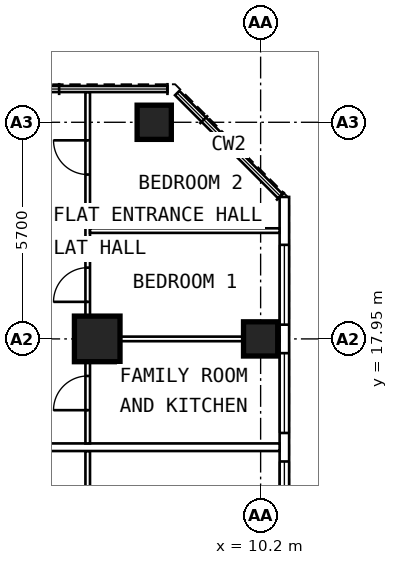
"""IFC4 building model, lengths in metres.
Left out: names, types, materials, properties, quantities, classifications, styles, units other than length and angle.
Written with IfcOpenShell. Run it as: python <this file> out.ifc"""

import sys

from ifc_helpers import new_model, si_unit, direction, frame, frame_2d, origin, origin_2d, place, context, subcontext, project, spatial, rectangle, extrude, element, fill, save


model = new_model("IFC4")
c1 = context("Model", 3, precision=1e-05, world=origin(), true_north=direction((0.0, 1.0)))
c2 = subcontext(c1, "Body", "Model", "MODEL_VIEW")
j1 = project(units=[si_unit("LENGTHUNIT", "METRE"), si_unit("PLANEANGLEUNIT", "RADIAN")], contexts=[c1])
p1 = place(None, origin())
s1 = spatial("IfcSite", under=j1, at=p1, CompositionType="ELEMENT")
p2 = place(p1, origin())
s2 = spatial("IfcBuilding", under=s1, at=p2, CompositionType="ELEMENT")
p3 = place(p2, frame((0.0, 0.0, 149.0)))
s3 = spatial("IfcBuildingStorey", under=s2, at=p3, CompositionType="ELEMENT", Elevation=149.0)
for number, where, z_axis, x_axis in (
    (1, (10.2, 17.95, 0.0), (0.0, 0.0, 1.0), (0.0, 1.0, 0.0)),
    (2, (7.4, 23.65, 0.0), (0.0, 0.0, 1.0), (0.0, 1.0, 0.0)),
):
    element("IfcColumn", number, at=place(p3, frame(where, z_axis=z_axis, x_axis=x_axis)), inside=s3, PredefinedType="COLUMN", context=c2, shape_type="SweptSolid", body=[
        extrude(rectangle(XDim=0.9, YDim=0.9, at=origin_2d()), origin(), (0.0, 0.0, 1.0), 3.6),
    ])
p4 = place(p3, frame((5.9, 17.95, 0.0), z_axis=(0.0, 0.0, 1.0), x_axis=(0.0, 1.0, 0.0)))
e3 = element("IfcColumn", 3, at=p4, inside=s3, PredefinedType="COLUMN", context=c2, shape_type="SweptSolid", body=[
    extrude(rectangle(XDim=1.2, YDim=1.2, at=origin_2d()), origin(), (0.0, 0.0, 1.0), 3.6),
])
p5 = place(p3, frame((10.825, 6.409, 0.0), z_axis=(0.0, 0.0, 1.0), x_axis=(0.0, 1.0, 0.0)))
e4 = element("IfcWall", 4, at=p5, inside=s3, PredefinedType="SOLIDWALL", context=c2, shape_type="SweptSolid", body=[
    extrude(rectangle(XDim=15.276, YDim=0.25, at=frame_2d((7.638, 0.0))), origin(), (0.0, 0.0, 1.0), 3.35),
])
p6 = place(p5, frame((0.516, 0.0, 0.8)))
e5 = element("IfcOpeningElement", 5, at=p6, cuts=e4, PredefinedType="OPENING", context=c2, shape_type="SweptSolid", body=[
    extrude(rectangle(XDim=2.1, YDim=1.8, at=frame_2d((1.05, 0.9))), frame((0.0, 0.137, 0.0), z_axis=(0.0, -1.0, 0.0), x_axis=(1.0, 0.0, 0.0)), (0.0, 0.0, 1.0), 0.274),
])
p7 = place(p5, frame((3.366, 0.0, 0.8)))
e6 = element("IfcOpeningElement", 6, at=p7, cuts=e4, PredefinedType="OPENING", context=c2, shape_type="SweptSolid", body=[
    extrude(rectangle(XDim=2.1, YDim=1.8, at=frame_2d((1.05, 0.9))), frame((0.0, 0.137, 0.0), z_axis=(0.0, -1.0, 0.0), x_axis=(1.0, 0.0, 0.0)), (0.0, 0.0, 1.0), 0.274),
])
p8 = place(p5, frame((6.216, 0.0, 0.8)))
e7 = element("IfcOpeningElement", 7, at=p8, cuts=e4, PredefinedType="OPENING", context=c2, shape_type="SweptSolid", body=[
    extrude(rectangle(XDim=2.1, YDim=1.8, at=frame_2d((1.05, 0.9))), frame((0.0, 0.137, 0.0), z_axis=(0.0, -1.0, 0.0), x_axis=(1.0, 0.0, 0.0)), (0.0, 0.0, 1.0), 0.274),
])
p9 = place(p5, frame((9.066, 0.0, 0.8)))
e8 = element("IfcOpeningElement", 8, at=p9, cuts=e4, PredefinedType="OPENING", context=c2, shape_type="SweptSolid", body=[
    extrude(rectangle(XDim=2.1, YDim=1.8, at=frame_2d((1.05, 0.9))), frame((0.0, 0.137, 0.0), z_axis=(0.0, -1.0, 0.0), x_axis=(1.0, 0.0, 0.0)), (0.0, 0.0, 1.0), 0.274),
])
p10 = place(p5, frame((11.916, 0.0, 0.8)))
e9 = element("IfcOpeningElement", 9, at=p10, cuts=e4, PredefinedType="OPENING", context=c2, shape_type="SweptSolid", body=[
    extrude(rectangle(XDim=2.1, YDim=1.8, at=frame_2d((1.05, 0.9))), frame((0.0, 0.137, 0.0), z_axis=(0.0, -1.0, 0.0), x_axis=(1.0, 0.0, 0.0)), (0.0, 0.0, 1.0), 0.274),
])
p11 = place(p3, frame((5.65, 9.6, 0.0), z_axis=(0.0, 0.0, 1.0), x_axis=(0.0, 1.0, 0.0)))
e10 = element("IfcWall", 10, at=p11, inside=s3, PredefinedType="PARTITIONING", context=c2, shape_type="SweptSolid", body=[
    extrude(rectangle(XDim=5.4, YDim=0.12, at=frame_2d((2.7, 0.0))), origin(), (0.0, 0.0, 1.0), 3.35),
])
p12 = place(p11, frame((3.4, 0.0, 0.0)))
e11 = element("IfcOpeningElement", 11, at=p12, cuts=e10, PredefinedType="OPENING", context=c2, shape_type="SweptSolid", body=[
    extrude(rectangle(XDim=0.9, YDim=2.1, at=frame_2d((0.45, 1.05))), frame((0.0, 0.072, 0.0), z_axis=(0.0, -1.0, 0.0), x_axis=(1.0, 0.0, 0.0)), (0.0, 0.0, 1.0), 0.144),
])
p13 = place(p3, frame((5.65, 15.2, 0.0), z_axis=(0.0, 0.0, 1.0), x_axis=(0.0, 1.0, 0.0)))
e12 = element("IfcWall", 12, at=p13, inside=s3, PredefinedType="PARTITIONING", context=c2, shape_type="SweptSolid", body=[
    extrude(rectangle(XDim=9.245, YDim=0.12, at=frame_2d((4.623, 0.0))), origin(), (0.0, 0.0, 1.0), 3.35),
])
p14 = place(p13, frame((0.875, 0.0, 0.0)))
e13 = element("IfcOpeningElement", 13, at=p14, cuts=e12, PredefinedType="OPENING", context=c2, shape_type="SweptSolid", body=[
    extrude(rectangle(XDim=0.9, YDim=2.1, at=frame_2d((0.45, 1.05))), frame((0.0, 0.072, 0.0), z_axis=(0.0, -1.0, 0.0), x_axis=(1.0, 0.0, 0.0)), (0.0, 0.0, 1.0), 0.144),
])
p15 = place(p13, frame((3.725, 0.0, 0.0)))
e14 = element("IfcOpeningElement", 14, at=p15, cuts=e12, PredefinedType="OPENING", context=c2, shape_type="SweptSolid", body=[
    extrude(rectangle(XDim=0.9, YDim=2.1, at=frame_2d((0.45, 1.05))), frame((0.0, 0.072, 0.0), z_axis=(0.0, -1.0, 0.0), x_axis=(1.0, 0.0, 0.0)), (0.0, 0.0, 1.0), 0.144),
])
p16 = place(p13, frame((7.075, 0.0, 0.0)))
e15 = element("IfcOpeningElement", 15, at=p16, cuts=e12, PredefinedType="OPENING", context=c2, shape_type="SweptSolid", body=[
    extrude(rectangle(XDim=0.9, YDim=2.1, at=frame_2d((0.45, 1.05))), frame((0.0, 0.072, 0.0), z_axis=(0.0, -1.0, 0.0), x_axis=(1.0, 0.0, 0.0)), (0.0, 0.0, 1.0), 0.144),
])
p17 = place(p3, frame((5.71, 17.95, 0.0), z_axis=(0.0, 0.0, 1.0), x_axis=(1.0, 0.0, 0.0)))
e16 = element("IfcWall", 16, at=p17, inside=s3, PredefinedType="PARTITIONING", context=c2, shape_type="SweptSolid", body=[
    extrude(rectangle(XDim=4.99, YDim=0.12, at=frame_2d((2.495, 0.0))), origin(), (0.0, 0.0, 1.0), 2.45),
])
p18 = place(p3, frame((5.71, 20.8, 0.0), z_axis=(0.0, 0.0, 1.0), x_axis=(1.0, 0.0, 0.0)))
e17 = element("IfcWall", 17, at=p18, inside=s3, PredefinedType="PARTITIONING", context=c2, shape_type="SweptSolid", body=[
    extrude(rectangle(XDim=4.99, YDim=0.12, at=frame_2d((2.495, 0.0))), origin(), (0.0, 0.0, 1.0), 3.35),
])
p19 = place(p3, frame((2.0, 15.1, 0.0), z_axis=(0.0, 0.0, 1.0), x_axis=(1.0, 0.0, 0.0)))
e18 = element("IfcWall", 18, at=p19, inside=s3, PredefinedType="PARTITIONING", context=c2, shape_type="SweptSolid", body=[
    extrude(rectangle(XDim=8.7, YDim=0.2, at=frame_2d((4.35, 0.0))), origin(), (0.0, 0.0, 1.0), 3.35),
])
p20 = place(p8, origin())
e19 = element("IfcWindow", 19, at=p20, inside=s3, PartitioningType="SINGLE_PANEL", PredefinedType="WINDOW", context=c2, shape_type="SweptSolid", body=[
    extrude(rectangle(XDim=2.1, YDim=1.8, at=frame_2d((1.05, 0.9))), frame((0.0, 0.03, 0.0), z_axis=(0.0, -1.0, 0.0), x_axis=(1.0, 0.0, 0.0)), (0.0, 0.0, 1.0), 0.06),
])
fill(e7, e19)
p21 = place(p9, origin())
e20 = element("IfcWindow", 20, at=p21, inside=s3, PartitioningType="SINGLE_PANEL", PredefinedType="WINDOW", context=c2, shape_type="SweptSolid", body=[
    extrude(rectangle(XDim=2.1, YDim=1.8, at=frame_2d((1.05, 0.9))), frame((0.0, 0.03, 0.0), z_axis=(0.0, -1.0, 0.0), x_axis=(1.0, 0.0, 0.0)), (0.0, 0.0, 1.0), 0.06),
])
fill(e8, e20)
p22 = place(p10, origin())
e21 = element("IfcWindow", 21, at=p22, inside=s3, PartitioningType="SINGLE_PANEL", PredefinedType="WINDOW", context=c2, shape_type="SweptSolid", body=[
    extrude(rectangle(XDim=2.1, YDim=1.8, at=frame_2d((1.05, 0.9))), frame((0.0, 0.03, 0.0), z_axis=(0.0, -1.0, 0.0), x_axis=(1.0, 0.0, 0.0)), (0.0, 0.0, 1.0), 0.06),
])
fill(e9, e21)
p23 = place(p14, origin())
e22 = element("IfcDoor", 22, at=p23, inside=s3, OperationType="SINGLE_SWING_LEFT", PredefinedType="DOOR", context=c2, shape_type="SweptSolid", body=[
    extrude(rectangle(XDim=0.9, YDim=2.1, at=frame_2d((0.45, 1.05))), frame((0.0, 0.025, 0.0), z_axis=(0.0, -1.0, 0.0), x_axis=(1.0, 0.0, 0.0)), (0.0, 0.0, 1.0), 0.05),
])
fill(e13, e22)
p24 = place(p15, origin())
e23 = element("IfcDoor", 23, at=p24, inside=s3, OperationType="SINGLE_SWING_LEFT", PredefinedType="DOOR", context=c2, shape_type="SweptSolid", body=[
    extrude(rectangle(XDim=0.9, YDim=2.1, at=frame_2d((0.45, 1.05))), frame((0.0, 0.025, 0.0), z_axis=(0.0, -1.0, 0.0), x_axis=(1.0, 0.0, 0.0)), (0.0, 0.0, 1.0), 0.05),
])
fill(e14, e23)
p25 = place(p16, origin())
e24 = element("IfcDoor", 24, at=p25, inside=s3, OperationType="SINGLE_SWING_RIGHT", PredefinedType="DOOR", context=c2, shape_type="SweptSolid", body=[
    extrude(rectangle(XDim=0.9, YDim=2.1, at=frame_2d((0.45, 1.05))), frame((0.0, 0.025, 0.0), z_axis=(0.0, -1.0, 0.0), x_axis=(1.0, 0.0, 0.0)), (0.0, 0.0, 1.0), 0.05),
])
fill(e15, e24)
save(model, sys.argv[1])
